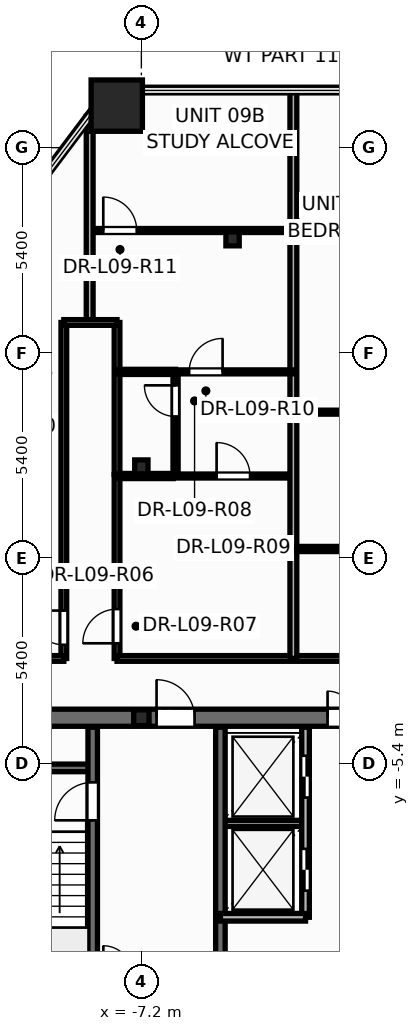
"""IFC4 building model, lengths in metres.
Left out: names, types, materials, properties, quantities, classifications, styles, units other than length and angle.
Written with IfcOpenShell. Run it as: python <this file> out.ifc"""

import sys

from ifc_helpers import new_model, si_unit, direction, frame, frame_2d, origin, origin_2d, place, context, subcontext, project, spatial, rectangle, hollow_rectangle, i_section, extrude, element, fill, save


model = new_model("IFC4")
c1 = context("Model", 3, precision=1e-05, world=origin(), true_north=direction((0.0, 1.0)))
c2 = subcontext(c1, "Body", "Model", "MODEL_VIEW")
j1 = project(units=[si_unit("LENGTHUNIT", "METRE"), si_unit("PLANEANGLEUNIT", "RADIAN")], contexts=[c1])
p1 = place(None, origin())
s1 = spatial("IfcSite", under=j1, at=p1, CompositionType="ELEMENT")
p2 = place(p1, origin())
s2 = spatial("IfcBuilding", under=s1, at=p2, CompositionType="ELEMENT")
p3 = place(p2, frame((0.0, 0.0, 38.7)))
s3 = spatial("IfcBuildingStorey", under=s2, at=p3, CompositionType="ELEMENT", Elevation=38.7)
p4 = place(p3, frame((-7.847, 11.906, 0.0), z_axis=(0.0, 0.0, 1.0), x_axis=(1.0, 0.0, 0.0)))
e1 = element("IfcColumn", 1, at=p4, inside=s3, PredefinedType="COLUMN", context=c2, shape_type="SweptSolid", body=[
    extrude(hollow_rectangle(XDim=1.35, YDim=1.35, WallThickness=0.065, at=origin_2d()), origin(), (0.0, 0.0, 1.0), 3.6),
])
p5 = place(p3, frame((-7.2, -4.2, 0.0), z_axis=(0.0, 0.0, 1.0), x_axis=(1.0, 0.0, 0.0)))
e2 = element("IfcColumn", 2, at=p5, inside=s3, PredefinedType="PILASTER", context=c2, shape_type="SweptSolid", body=[
    extrude(i_section(OverallWidth=0.405, OverallDepth=0.414, WebThickness=0.022, FlangeThickness=0.032, at=origin_2d()), origin(), (0.0, 0.0, 1.0), 3.6),
])
for number, where, z_axis, x_axis in (
    (3, (-7.2, 2.4, 0.0), (0.0, 0.0, 1.0), (1.0, 0.0, 0.0)),
    (4, (-4.8, 8.4, 0.0), (0.0, 0.0, 1.0), (1.0, 0.0, 0.0)),
):
    element("IfcColumn", number, at=place(p3, frame(where, z_axis=z_axis, x_axis=x_axis)), inside=s3, PredefinedType="COLUMN", context=c2, shape_type="SweptSolid", body=[
        extrude(i_section(OverallWidth=0.35, OverallDepth=0.367, WebThickness=0.025, FlangeThickness=0.032, at=origin_2d()), origin(), (0.0, 0.0, 1.0), 3.6),
    ])
p6 = place(p3, frame((-5.12, -6.98, 0.0), z_axis=(0.0, 0.0, 1.0), x_axis=(1.0, 0.0, 0.0)))
e5 = element("IfcWall", 5, at=p6, inside=s3, PredefinedType="PARTITIONING", context=c2, shape_type="SweptSolid", body=[
    extrude(rectangle(XDim=2.24, YDim=0.16, at=frame_2d((1.12, 0.0))), origin(), (0.0, 0.0, 1.0), 3.35),
])
p7 = place(p3, frame((-12.65, -4.2, 0.0), z_axis=(0.0, 0.0, 1.0), x_axis=(1.0, 0.0, 0.0)))
e6 = element("IfcWall", 6, at=p7, inside=s3, PredefinedType="SHEAR", context=c2, shape_type="SweptSolid", body=[
    extrude(rectangle(XDim=25.3, YDim=0.45, at=frame_2d((12.65, 0.0))), origin(), (0.0, 0.0, 1.0), 3.6),
])
p8 = place(p7, frame((1.85, 0.0, 0.0)))
e7 = element("IfcOpeningElement", 7, at=p8, cuts=e6, PredefinedType="OPENING", context=c2, shape_type="SweptSolid", body=[
    extrude(rectangle(XDim=0.756, YDim=2.054, at=frame_2d((0.375, 1.027))), frame((0.0, 0.235, 0.0), z_axis=(0.0, -1.0, 0.0), x_axis=(1.0, 0.0, 0.0)), (0.0, 0.0, 1.0), 0.47),
])
p9 = place(p7, frame((22.65, 0.0, 0.0)))
e8 = element("IfcOpeningElement", 8, at=p9, cuts=e6, PredefinedType="OPENING", context=c2, shape_type="SweptSolid", body=[
    extrude(rectangle(XDim=0.756, YDim=2.054, at=frame_2d((0.375, 1.027))), frame((0.0, 0.235, 0.0), z_axis=(0.0, -1.0, 0.0), x_axis=(1.0, 0.0, 0.0)), (0.0, 0.0, 1.0), 0.47),
])
p10 = place(p7, frame((5.85, 0.0, 0.0)))
e9 = element("IfcOpeningElement", 9, at=p10, cuts=e6, PredefinedType="OPENING", context=c2, shape_type="SweptSolid", body=[
    extrude(rectangle(XDim=1.006, YDim=2.104, at=frame_2d((0.5, 1.052))), frame((0.0, 0.235, 0.0), z_axis=(0.0, -1.0, 0.0), x_axis=(1.0, 0.0, 0.0)), (0.0, 0.0, 1.0), 0.47),
])
p11 = place(p7, frame((10.35, 0.0, 0.0)))
e10 = element("IfcOpeningElement", 10, at=p11, cuts=e6, PredefinedType="OPENING", context=c2, shape_type="SweptSolid", body=[
    extrude(rectangle(XDim=1.406, YDim=2.154, at=frame_2d((0.7, 1.077))), frame((0.0, 0.235, 0.0), z_axis=(0.0, -1.0, 0.0), x_axis=(1.0, 0.0, 0.0)), (0.0, 0.0, 1.0), 0.47),
])
p12 = place(p7, frame((18.45, 0.0, 0.0)))
e11 = element("IfcOpeningElement", 11, at=p12, cuts=e6, PredefinedType="OPENING", context=c2, shape_type="SweptSolid", body=[
    extrude(rectangle(XDim=1.006, YDim=2.104, at=frame_2d((0.5, 1.052))), frame((0.0, 0.235, 0.0), z_axis=(0.0, -1.0, 0.0), x_axis=(1.0, 0.0, 0.0)), (0.0, 0.0, 1.0), 0.47),
])
p13 = place(p3, frame((-12.35, -5.52, 0.0), z_axis=(0.0, 0.0, 1.0), x_axis=(1.0, 0.0, 0.0)))
e12 = element("IfcWall", 12, at=p13, inside=s3, PredefinedType="SOLIDWALL", context=c2, shape_type="SweptSolid", body=[
    extrude(rectangle(XDim=3.87, YDim=0.2, at=frame_2d((1.935, 0.0))), origin(), (0.0, 0.0, 1.0), 3.6),
])
p14 = place(p3, frame((-8.48, -13.85, 0.0), z_axis=(0.0, 0.0, 1.0), x_axis=(0.0, 1.0, 0.0)))
e13 = element("IfcWall", 13, at=p14, inside=s3, PredefinedType="SHEAR", context=c2, shape_type="SweptSolid", body=[
    extrude(rectangle(XDim=9.4, YDim=0.25, at=frame_2d((4.7, 0.0))), origin(), (0.0, 0.0, 1.0), 3.6),
])
p15 = place(p14, frame((6.95, 0.0, 0.0)))
e14 = element("IfcOpeningElement", 14, at=p15, cuts=e13, PredefinedType="OPENING", context=c2, shape_type="SweptSolid", body=[
    extrude(rectangle(XDim=1.006, YDim=2.104, at=frame_2d((0.5, 1.052))), frame((0.0, 0.135, 0.0), z_axis=(0.0, -1.0, 0.0), x_axis=(1.0, 0.0, 0.0)), (0.0, 0.0, 1.0), 0.27),
])
p16 = place(p3, frame((-5.12, -13.85, 0.0), z_axis=(0.0, 0.0, 1.0), x_axis=(0.0, 1.0, 0.0)))
e15 = element("IfcWall", 15, at=p16, inside=s3, PredefinedType="SHEAR", context=c2, shape_type="SweptSolid", body=[
    extrude(rectangle(XDim=9.4, YDim=0.25, at=frame_2d((4.7, 0.0))), origin(), (0.0, 0.0, 1.0), 3.6),
])
p17 = place(p3, frame((-2.88, -9.45, 0.0), z_axis=(0.0, 0.0, 1.0), x_axis=(0.0, 1.0, 0.0)))
e16 = element("IfcWall", 16, at=p17, inside=s3, PredefinedType="SOLIDWALL", context=c2, shape_type="SweptSolid", body=[
    extrude(rectangle(XDim=5.0, YDim=0.2, at=frame_2d((2.5, 0.0))), origin(), (0.0, 0.0, 1.0), 3.35),
])
p18 = place(p17, frame((0.7, 0.0, 0.0)))
e17 = element("IfcOpeningElement", 17, at=p18, cuts=e16, PredefinedType="OPENING", context=c2, shape_type="SweptSolid", body=[
    extrude(rectangle(XDim=1.106, YDim=2.104, at=frame_2d((0.55, 1.052))), frame((0.0, 0.11, 0.0), z_axis=(0.0, -1.0, 0.0), x_axis=(1.0, 0.0, 0.0)), (0.0, 0.0, 1.0), 0.22),
])
p19 = place(p17, frame((3.15, 0.0, 0.0)))
e18 = element("IfcOpeningElement", 18, at=p19, cuts=e16, PredefinedType="OPENING", context=c2, shape_type="SweptSolid", body=[
    extrude(rectangle(XDim=1.106, YDim=2.104, at=frame_2d((0.55, 1.052))), frame((0.0, 0.11, 0.0), z_axis=(0.0, -1.0, 0.0), x_axis=(1.0, 0.0, 0.0)), (0.0, 0.0, 1.0), 0.22),
])
p20 = place(p3, frame((-5.12, -9.45, 0.0), z_axis=(0.0, 0.0, 1.0), x_axis=(1.0, 0.0, 0.0)))
e19 = element("IfcWall", 19, at=p20, inside=s3, PredefinedType="SOLIDWALL", context=c2, shape_type="SweptSolid", body=[
    extrude(rectangle(XDim=2.24, YDim=0.2, at=frame_2d((1.12, 0.0))), origin(), (0.0, 0.0, 1.0), 3.35),
])
p21 = place(p3, frame((-9.24, -2.64, 0.0), z_axis=(0.0, 0.0, 1.0), x_axis=(0.0, 1.0, 0.0)))
e20 = element("IfcWall", 20, at=p21, inside=s3, PredefinedType="PARTITIONING", context=c2, shape_type="SweptSolid", body=[
    extrude(rectangle(XDim=8.84, YDim=0.15, at=frame_2d((4.42, 0.0))), origin(), (0.0, 0.0, 1.0), 2.509),
])
p22 = place(p21, frame((0.359, 0.0, 0.0)))
e21 = element("IfcOpeningElement", 21, at=p22, cuts=e20, PredefinedType="OPENING", context=c2, shape_type="SweptSolid", body=[
    extrude(rectangle(XDim=0.906, YDim=2.104, at=frame_2d((0.45, 1.052))), frame((0.0, 0.085, 0.0), z_axis=(0.0, -1.0, 0.0), x_axis=(1.0, 0.0, 0.0)), (0.0, 0.0, 1.0), 0.17),
])
p23 = place(p3, frame((-8.56, 8.62, 0.0), z_axis=(0.0, 0.0, 1.0), x_axis=(1.0, 0.0, 0.0)))
e22 = element("IfcWall", 22, at=p23, inside=s3, PredefinedType="PARTITIONING", context=c2, shape_type="SweptSolid", body=[
    extrude(rectangle(XDim=5.36, YDim=0.105, at=frame_2d((2.68, 0.0))), origin(), (0.0, 0.0, 1.0), 2.509),
])
p24 = place(p23, frame((0.358, 0.0, 0.0)))
e23 = element("IfcOpeningElement", 23, at=p24, cuts=e22, PredefinedType="OPENING", context=c2, shape_type="SweptSolid", body=[
    extrude(rectangle(XDim=0.886, YDim=2.104, at=frame_2d((0.44, 1.052))), frame((0.0, 0.062, 0.0), z_axis=(0.0, -1.0, 0.0), x_axis=(1.0, 0.0, 0.0)), (0.0, 0.0, 1.0), 0.125),
])
p25 = place(p3, frame((-7.84, -2.64, 0.0), z_axis=(0.0, 0.0, 1.0), x_axis=(0.0, 1.0, 0.0)))
e24 = element("IfcWall", 24, at=p25, inside=s3, PredefinedType="PARTITIONING", context=c2, shape_type="SweptSolid", body=[
    extrude(rectangle(XDim=4.84, YDim=0.15, at=frame_2d((2.42, 0.0))), origin(), (0.0, 0.0, 1.0), 2.509),
])
p26 = place(p25, frame((0.398, 0.0, 0.0)))
e25 = element("IfcOpeningElement", 25, at=p26, cuts=e24, PredefinedType="OPENING", context=c2, shape_type="SweptSolid", body=[
    extrude(rectangle(XDim=0.906, YDim=2.104, at=frame_2d((0.45, 1.052))), frame((0.0, 0.085, 0.0), z_axis=(0.0, -1.0, 0.0), x_axis=(1.0, 0.0, 0.0)), (0.0, 0.0, 1.0), 0.17),
])
p27 = place(p3, frame((-7.84, -2.64, 0.0), z_axis=(0.0, 0.0, 1.0), x_axis=(1.0, 0.0, 0.0)))
e26 = element("IfcWall", 26, at=p27, inside=s3, PredefinedType="PARTITIONING", context=c2, shape_type="SweptSolid", body=[
    extrude(rectangle(XDim=7.0, YDim=0.15, at=frame_2d((3.5, 0.0))), origin(), (0.0, 0.0, 1.0), 2.325),
])
p28 = place(p3, frame((-3.2, 3.8, 0.0), z_axis=(0.0, 0.0, 1.0), x_axis=(0.0, 1.0, 0.0)))
e27 = element("IfcWall", 27, at=p28, inside=s3, PredefinedType="PARTITIONING", context=c2, shape_type="SweptSolid", body=[
    extrude(rectangle(XDim=8.506, YDim=0.18, at=frame_2d((4.253, 0.0))), origin(), (0.0, 0.0, 1.0), 2.509),
])
p29 = place(p3, frame((-12.5, -2.64, 0.0), z_axis=(0.0, 0.0, 1.0), x_axis=(1.0, 0.0, 0.0)))
e28 = element("IfcWall", 28, at=p29, inside=s3, PredefinedType="PARTITIONING", context=c2, shape_type="SweptSolid", body=[
    extrude(rectangle(XDim=3.26, YDim=0.15, at=frame_2d((1.63, 0.0))), origin(), (0.0, 0.0, 1.0), 3.35),
])
p30 = place(p3, frame((-6.36, 2.16, 0.0), z_axis=(0.0, 0.0, 1.0), x_axis=(1.0, 0.0, 0.0)))
e29 = element("IfcWall", 29, at=p30, inside=s3, PredefinedType="PARTITIONING", context=c2, shape_type="SweptSolid", body=[
    extrude(rectangle(XDim=3.16, YDim=0.105, at=frame_2d((1.58, 0.0))), origin(), (0.0, 0.0, 1.0), 2.325),
])
p31 = place(p30, frame((1.14, 0.0, 0.0)))
e30 = element("IfcOpeningElement", 30, at=p31, cuts=e29, PredefinedType="OPENING", context=c2, shape_type="SweptSolid", body=[
    extrude(rectangle(XDim=0.886, YDim=2.104, at=frame_2d((0.44, 1.052))), frame((0.0, 0.062, 0.0), z_axis=(0.0, -1.0, 0.0), x_axis=(1.0, 0.0, 0.0)), (0.0, 0.0, 1.0), 0.125),
])
p32 = place(p3, frame((-6.3, 4.9, 0.0), z_axis=(0.0, 0.0, 1.0), x_axis=(1.0, 0.0, 0.0)))
e31 = element("IfcWall", 31, at=p32, inside=s3, PredefinedType="PARTITIONING", context=c2, shape_type="SweptSolid", body=[
    extrude(rectangle(XDim=3.1, YDim=0.105, at=frame_2d((1.55, 0.0))), origin(), (0.0, 0.0, 1.0), 2.509),
])
p33 = place(p32, frame((0.358, 0.0, 0.0)))
e32 = element("IfcOpeningElement", 32, at=p33, cuts=e31, PredefinedType="OPENING", context=c2, shape_type="SweptSolid", body=[
    extrude(rectangle(XDim=0.886, YDim=2.104, at=frame_2d((0.44, 1.052))), frame((0.0, 0.062, 0.0), z_axis=(0.0, -1.0, 0.0), x_axis=(1.0, 0.0, 0.0)), (0.0, 0.0, 1.0), 0.125),
])
p34 = place(p3, frame((-8.56, 6.2, 0.0), z_axis=(0.0, 0.0, 1.0), x_axis=(0.0, 1.0, 0.0)))
e33 = element("IfcWall", 33, at=p34, inside=s3, PredefinedType="PARTITIONING", context=c2, shape_type="SweptSolid", body=[
    extrude(rectangle(XDim=5.425, YDim=0.18, at=frame_2d((2.712, 0.0))), origin(), (0.0, 0.0, 1.0), 2.509),
])
p35 = place(p3, frame((-3.2, -2.64, 0.0), z_axis=(0.0, 0.0, 1.0), x_axis=(0.0, 1.0, 0.0)))
e34 = element("IfcWall", 34, at=p35, inside=s3, PredefinedType="PARTITIONING", context=c2, shape_type="SweptSolid", body=[
    extrude(rectangle(XDim=6.438, YDim=0.18, at=frame_2d((3.219, 0.0))), origin(), (0.0, 0.0, 1.0), 2.325),
])
p36 = place(p3, frame((-7.84, 2.202, 0.0), z_axis=(0.0, 0.0, 1.0), x_axis=(0.0, 1.0, 0.0)))
e35 = element("IfcWall", 35, at=p36, inside=s3, PredefinedType="PARTITIONING", context=c2, shape_type="SweptSolid", body=[
    extrude(rectangle(XDim=3.998, YDim=0.15, at=frame_2d((1.999, 0.0))), origin(), (0.0, 0.0, 1.0), 2.509),
])
p37 = place(p3, frame((-6.3, 2.16, 0.0), z_axis=(0.0, 0.0, 1.0), x_axis=(0.0, 1.0, 0.0)))
e36 = element("IfcWall", 36, at=p37, inside=s3, PredefinedType="PARTITIONING", context=c2, shape_type="SweptSolid", body=[
    extrude(rectangle(XDim=2.74, YDim=0.135, at=frame_2d((1.37, 0.0))), origin(), (0.0, 0.0, 1.0), 2.325),
])
p38 = place(p37, frame((1.566, 0.0, 0.0)))
e37 = element("IfcOpeningElement", 37, at=p38, cuts=e36, PredefinedType="OPENING", context=c2, shape_type="SweptSolid", body=[
    extrude(rectangle(XDim=0.826, YDim=2.104, at=frame_2d((0.41, 1.052))), frame((0.0, 0.078, 0.0), z_axis=(0.0, -1.0, 0.0), x_axis=(1.0, 0.0, 0.0)), (0.0, 0.0, 1.0), 0.155),
])
p39 = place(p3, frame((-3.2, 0.24, 0.0), z_axis=(0.0, 0.0, 1.0), x_axis=(1.0, 0.0, 0.0)))
e38 = element("IfcWall", 38, at=p39, inside=s3, PredefinedType="PARTITIONING", context=c2, shape_type="SweptSolid", body=[
    extrude(rectangle(XDim=2.3, YDim=0.135, at=frame_2d((1.15, 0.0))), origin(), (0.0, 0.0, 1.0), 3.35),
])
p40 = place(p3, frame((-3.2, 3.84, 0.0), z_axis=(0.0, 0.0, 1.0), x_axis=(1.0, 0.0, 0.0)))
e39 = element("IfcWall", 39, at=p40, inside=s3, PredefinedType="PARTITIONING", context=c2, shape_type="SweptSolid", body=[
    extrude(rectangle(XDim=2.758, YDim=0.105, at=frame_2d((1.379, 0.0))), origin(), (0.0, 0.0, 1.0), 2.919),
])
p41 = place(p3, frame((-7.84, 2.16, 0.0), z_axis=(0.0, 0.0, 1.0), x_axis=(1.0, 0.0, 0.0)))
e40 = element("IfcWall", 40, at=p41, inside=s3, PredefinedType="PARTITIONING", context=c2, shape_type="SweptSolid", body=[
    extrude(rectangle(XDim=1.478, YDim=0.135, at=frame_2d((0.739, 0.0))), origin(), (0.0, 0.0, 1.0), 2.325),
])
p42 = place(p3, frame((-7.84, 4.9, 0.0), z_axis=(0.0, 0.0, 1.0), x_axis=(1.0, 0.0, 0.0)))
e41 = element("IfcWall", 41, at=p42, inside=s3, PredefinedType="PARTITIONING", context=c2, shape_type="SweptSolid", body=[
    extrude(rectangle(XDim=1.54, YDim=0.135, at=frame_2d((0.77, 0.0))), origin(), (0.0, 0.0, 1.0), 2.509),
])
p43 = place(p3, frame((-9.24, 6.2, 0.0), z_axis=(0.0, 0.0, 1.0), x_axis=(1.0, 0.0, 0.0)))
e42 = element("IfcWall", 42, at=p43, inside=s3, PredefinedType="PARTITIONING", context=c2, shape_type="SweptSolid", body=[
    extrude(rectangle(XDim=1.4, YDim=0.15, at=frame_2d((0.7, 0.0))), origin(), (0.0, 0.0, 1.0), 3.35),
])
p44 = place(p18, origin())
e43 = element("IfcDoor", 43, at=p44, inside=s3, OperationType="DOUBLE_DOOR_SLIDING", PredefinedType="DOOR", context=c2, shape_type="SweptSolid", body=[
    extrude(rectangle(XDim=1.1, YDim=2.1, at=frame_2d((0.55, 1.05))), frame((0.0, 0.025, 0.0), z_axis=(0.0, -1.0, 0.0), x_axis=(1.0, 0.0, 0.0)), (0.0, 0.0, 1.0), 0.05),
])
fill(e17, e43)
p45 = place(p19, origin())
e44 = element("IfcDoor", 44, at=p45, inside=s3, OperationType="DOUBLE_DOOR_SLIDING", PredefinedType="DOOR", context=c2, shape_type="SweptSolid", body=[
    extrude(rectangle(XDim=1.1, YDim=2.1, at=frame_2d((0.55, 1.05))), frame((0.0, 0.025, 0.0), z_axis=(0.0, -1.0, 0.0), x_axis=(1.0, 0.0, 0.0)), (0.0, 0.0, 1.0), 0.05),
])
fill(e18, e44)
p46 = place(p15, origin())
e45 = element("IfcDoor", 45, at=p46, inside=s3, OperationType="SINGLE_SWING_LEFT", PredefinedType="DOOR", context=c2, shape_type="SweptSolid", body=[
    extrude(rectangle(XDim=1.0, YDim=2.1, at=frame_2d((0.5, 1.05))), frame((0.0, 0.025, 0.0), z_axis=(0.0, -1.0, 0.0), x_axis=(1.0, 0.0, 0.0)), (0.0, 0.0, 1.0), 0.05),
])
fill(e14, e45)
p47 = place(p10, origin())
e46 = element("IfcDoor", 46, at=p47, inside=s3, OperationType="SINGLE_SWING_LEFT", PredefinedType="DOOR", context=c2, shape_type="SweptSolid", body=[
    extrude(rectangle(XDim=1.0, YDim=2.1, at=frame_2d((0.5, 1.05))), frame((0.0, 0.025, 0.0), z_axis=(0.0, -1.0, 0.0), x_axis=(1.0, 0.0, 0.0)), (0.0, 0.0, 1.0), 0.05),
])
fill(e9, e46)
p48 = place(p11, origin())
e47 = element("IfcDoor", 47, at=p48, inside=s3, OperationType="DOUBLE_DOOR_SINGLE_SWING", PredefinedType="DOOR", context=c2, shape_type="SweptSolid", body=[
    extrude(rectangle(XDim=1.4, YDim=2.15, at=frame_2d((0.7, 1.075))), frame((0.0, 0.025, 0.0), z_axis=(0.0, -1.0, 0.0), x_axis=(1.0, 0.0, 0.0)), (0.0, 0.0, 1.0), 0.05),
])
fill(e10, e47)
p49 = place(p22, origin())
e48 = element("IfcDoor", 48, at=p49, inside=s3, OperationType="SINGLE_SWING_RIGHT", PredefinedType="DOOR", context=c2, shape_type="SweptSolid", body=[
    extrude(rectangle(XDim=0.9, YDim=2.1, at=frame_2d((0.45, 1.05))), frame((0.0, 0.025, 0.0), z_axis=(0.0, -1.0, 0.0), x_axis=(1.0, 0.0, 0.0)), (0.0, 0.0, 1.0), 0.05),
])
fill(e21, e48)
p50 = place(p26, origin())
e49 = element("IfcDoor", 49, at=p50, inside=s3, OperationType="SINGLE_SWING_LEFT", PredefinedType="DOOR", context=c2, shape_type="SweptSolid", body=[
    extrude(rectangle(XDim=0.9, YDim=2.1, at=frame_2d((0.45, 1.05))), frame((0.0, 0.025, 0.0), z_axis=(0.0, -1.0, 0.0), x_axis=(1.0, 0.0, 0.0)), (0.0, 0.0, 1.0), 0.05),
])
fill(e25, e49)
p51 = place(p38, origin())
e50 = element("IfcDoor", 50, at=p51, inside=s3, OperationType="SINGLE_SWING_RIGHT", PredefinedType="DOOR", context=c2, shape_type="SweptSolid", body=[
    extrude(rectangle(XDim=0.82, YDim=2.1, at=frame_2d((0.41, 1.05))), frame((0.0, 0.025, 0.0), z_axis=(0.0, -1.0, 0.0), x_axis=(1.0, 0.0, 0.0)), (0.0, 0.0, 1.0), 0.05),
])
fill(e37, e50)
p52 = place(p31, origin())
e51 = element("IfcDoor", 51, at=p52, inside=s3, OperationType="SINGLE_SWING_LEFT", PredefinedType="DOOR", context=c2, shape_type="SweptSolid", body=[
    extrude(rectangle(XDim=0.88, YDim=2.1, at=frame_2d((0.44, 1.05))), frame((0.0, 0.025, 0.0), z_axis=(0.0, -1.0, 0.0), x_axis=(1.0, 0.0, 0.0)), (0.0, 0.0, 1.0), 0.05),
])
fill(e30, e51)
p53 = place(p33, origin())
e52 = element("IfcDoor", 52, at=p53, inside=s3, OperationType="SINGLE_SWING_RIGHT", PredefinedType="DOOR", context=c2, shape_type="SweptSolid", body=[
    extrude(rectangle(XDim=0.88, YDim=2.1, at=frame_2d((0.44, 1.05))), frame((0.0, 0.025, 0.0), z_axis=(0.0, -1.0, 0.0), x_axis=(1.0, 0.0, 0.0)), (0.0, 0.0, 1.0), 0.05),
])
fill(e32, e52)
p54 = place(p24, origin())
e53 = element("IfcDoor", 53, at=p54, inside=s3, OperationType="SINGLE_SWING_LEFT", PredefinedType="DOOR", context=c2, shape_type="SweptSolid", body=[
    extrude(rectangle(XDim=0.88, YDim=2.1, at=frame_2d((0.44, 1.05))), frame((0.0, 0.025, 0.0), z_axis=(0.0, -1.0, 0.0), x_axis=(1.0, 0.0, 0.0)), (0.0, 0.0, 1.0), 0.05),
])
fill(e23, e53)
save(model, sys.argv[1])
